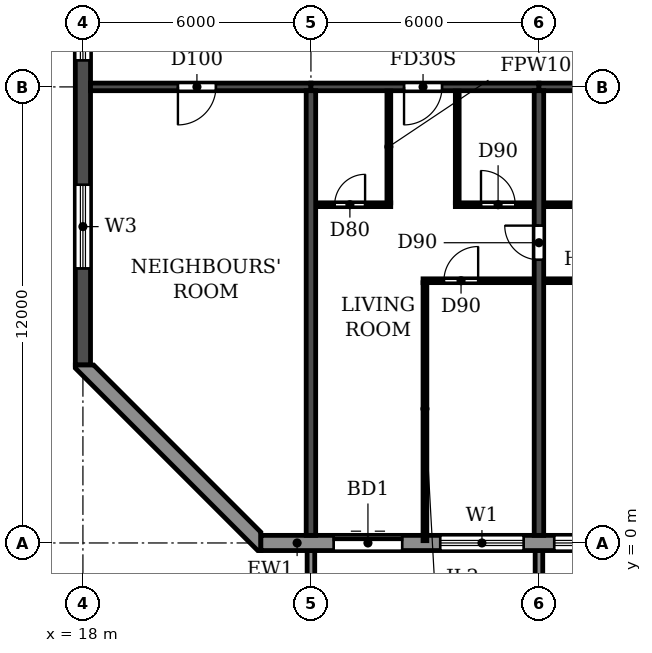
"""IFC4 building model, lengths in metres.
Left out: names, types, materials, properties, quantities, classifications, styles, units other than length and angle.
Written with IfcOpenShell. Run it as: python <this file> out.ifc"""

import sys

from ifc_helpers import new_model, si_unit, direction, frame, frame_2d, origin, place, context, subcontext, project, spatial, polyline, rectangle, outline, extrude, source, transform, mapped, element, fill, save


model = new_model("IFC4")
c1 = context("Model", 3, precision=1e-05, world=origin(), true_north=direction((0.0, 1.0)))
c2 = subcontext(c1, "Body", "Model", "MODEL_VIEW")
j1 = project(units=[si_unit("LENGTHUNIT", "METRE"), si_unit("PLANEANGLEUNIT", "RADIAN")], contexts=[c1])
p1 = place(None, origin())
s1 = spatial("IfcSite", under=j1, at=p1, CompositionType="ELEMENT")
p2 = place(p1, origin())
s2 = spatial("IfcBuilding", under=s1, at=p2, CompositionType="ELEMENT")
p3 = place(p2, frame((0.0, 0.0, 201.6)))
s3 = spatial("IfcBuildingStorey", under=s2, at=p3, CompositionType="ELEMENT", Elevation=201.6)
p4 = place(p3, frame((24.0, 0.2, 0.0), z_axis=(0.0, 0.0, 1.0), x_axis=(0.0, 1.0, 0.0)))
e1 = element("IfcWall", 1, at=p4, inside=s3, PredefinedType="SHEAR", context=c2, shape_type="SweptSolid", body=[
    extrude(rectangle(XDim=11.7, YDim=0.25, at=frame_2d((5.85, 0.0))), origin(), (0.0, 0.0, 1.0), 3.08),
])
p5 = place(p3, frame((30.0, 0.2, 0.0), z_axis=(0.0, 0.0, 1.0), x_axis=(0.0, 1.0, 0.0)))
e2 = element("IfcWall", 2, at=p5, inside=s3, PredefinedType="SHEAR", context=c2, shape_type="SweptSolid", body=[
    extrude(rectangle(XDim=11.7, YDim=0.25, at=frame_2d((5.85, 0.0))), origin(), (0.0, 0.0, 1.0), 3.08),
])
p6 = place(p5, frame((7.25, 0.0, 0.0)))
e3 = element("IfcOpeningElement", 3, at=p6, cuts=e2, PredefinedType="OPENING", context=c2, shape_type="SweptSolid", body=[
    extrude(rectangle(XDim=0.9, YDim=2.1, at=frame_2d((0.45, 1.05))), frame((0.0, 0.135, 0.0), z_axis=(0.0, -1.0, 0.0), x_axis=(1.0, 0.0, 0.0)), (0.0, 0.0, 1.0), 0.27),
])
p7 = place(p3, frame((18.0, 4.683, 0.0), z_axis=(0.0, 0.0, 1.0), x_axis=(0.0, 1.0, 0.0)))
e4 = element("IfcWall", 4, at=p7, inside=s3, PredefinedType="SHEAR", context=c2, shape_type="SweptSolid", body=[
    extrude(rectangle(XDim=31.834, YDim=0.4, at=frame_2d((15.917, 0.0))), origin(), (0.0, 0.0, 1.0), 3.08),
])
p8 = place(p7, frame((23.817, 0.0, 0.9)))
e5 = element("IfcOpeningElement", 5, at=p8, cuts=e4, PredefinedType="OPENING", context=c2, shape_type="SweptSolid", body=[
    extrude(rectangle(XDim=1.2, YDim=1.5, at=frame_2d((0.6, 0.75))), frame((0.0, 0.21, 0.0), z_axis=(0.0, -1.0, 0.0), x_axis=(1.0, 0.0, 0.0)), (0.0, 0.0, 1.0), 0.42),
])
p9 = place(p7, frame((8.017, 0.0, 0.9)))
e6 = element("IfcOpeningElement", 6, at=p9, cuts=e4, PredefinedType="OPENING", context=c2, shape_type="SweptSolid", body=[
    extrude(rectangle(XDim=1.2, YDim=1.5, at=frame_2d((0.6, 0.75))), frame((0.0, 0.21, 0.0), z_axis=(0.0, -1.0, 0.0), x_axis=(1.0, 0.0, 0.0)), (0.0, 0.0, 1.0), 0.42),
])
p10 = place(p7, frame((27.694, 0.0, 0.6)))
e7 = element("IfcOpeningElement", 7, at=p10, cuts=e4, PredefinedType="OPENING", context=c2, shape_type="SweptSolid", body=[
    extrude(rectangle(XDim=2.2, YDim=1.8, at=frame_2d((1.1, 0.9))), frame((0.0, 0.21, 0.0), z_axis=(0.0, -1.0, 0.0), x_axis=(1.0, 0.0, 0.0)), (0.0, 0.0, 1.0), 0.42),
])
p11 = place(p7, frame((2.541, 0.0, 0.6)))
e8 = element("IfcOpeningElement", 8, at=p11, cuts=e4, PredefinedType="OPENING", context=c2, shape_type="SweptSolid", body=[
    extrude(rectangle(XDim=2.2, YDim=1.8, at=frame_2d((1.1, 0.9))), frame((0.0, 0.21, 0.0), z_axis=(0.0, -1.0, 0.0), x_axis=(1.0, 0.0, 0.0)), (0.0, 0.0, 1.0), 0.42),
])
p12 = place(p7, frame((15.917, 0.0, 0.9)))
e9 = element("IfcOpeningElement", 9, at=p12, cuts=e4, PredefinedType="OPENING", context=c2, shape_type="SweptSolid", body=[
    extrude(rectangle(XDim=1.2, YDim=1.5, at=frame_2d((0.6, 0.75))), frame((0.0, 0.21, 0.0), z_axis=(0.0, -1.0, 0.0), x_axis=(1.0, 0.0, 0.0)), (0.0, 0.0, 1.0), 0.42),
])
p13 = place(p3, frame((18.2, 12.0, 0.0), z_axis=(0.0, 0.0, 1.0), x_axis=(1.0, 0.0, 0.0)))
e10 = element("IfcWall", 10, at=p13, inside=s3, PredefinedType="SHEAR", context=c2, shape_type="SweptSolid", body=[
    extrude(rectangle(XDim=5.8, YDim=0.2, at=frame_2d((2.9, 0.0))), origin(), (0.0, 0.0, 1.0), 2.48),
])
p14 = place(p13, frame((2.3, 0.0, 0.0)))
e11 = element("IfcOpeningElement", 11, at=p14, cuts=e10, PredefinedType="OPENING", context=c2, shape_type="SweptSolid", body=[
    extrude(rectangle(XDim=1.0, YDim=2.1, at=frame_2d((0.5, 1.05))), frame((0.0, 0.11, 0.0), z_axis=(0.0, -1.0, 0.0), x_axis=(1.0, 0.0, 0.0)), (0.0, 0.0, 1.0), 0.22),
])
p15 = place(p3, frame((24.0, 12.0, 0.0), z_axis=(0.0, 0.0, 1.0), x_axis=(1.0, 0.0, 0.0)))
e12 = element("IfcWall", 12, at=p15, inside=s3, PredefinedType="SHEAR", context=c2, shape_type="SweptSolid", body=[
    extrude(rectangle(XDim=6.0, YDim=0.2, at=frame_2d((3.0, 0.0))), origin(), (0.0, 0.0, 1.0), 2.48),
])
p16 = place(p15, frame((2.45, 0.0, 0.0)))
e13 = element("IfcOpeningElement", 13, at=p16, cuts=e12, PredefinedType="OPENING", context=c2, shape_type="SweptSolid", body=[
    extrude(rectangle(XDim=1.0, YDim=2.1, at=frame_2d((0.5, 1.05))), frame((0.0, 0.11, 0.0), z_axis=(0.0, -1.0, 0.0), x_axis=(1.0, 0.0, 0.0)), (0.0, 0.0, 1.0), 0.22),
])
p17 = place(p3, frame((30.0, 12.0, 0.0), z_axis=(0.0, 0.0, 1.0), x_axis=(1.0, 0.0, 0.0)))
e14 = element("IfcWall", 14, at=p17, inside=s3, PredefinedType="SHEAR", context=c2, shape_type="SweptSolid", body=[
    extrude(rectangle(XDim=6.0, YDim=0.2, at=frame_2d((3.0, 0.0))), origin(), (0.0, 0.0, 1.0), 2.48),
])
p18 = place(p3, frame((22.683, 0.0, 0.0), z_axis=(0.0, 0.0, 1.0), x_axis=(1.0, 0.0, 0.0)))
e15 = element("IfcWall", 15, at=p18, inside=s3, PredefinedType="STANDARD", context=c2, shape_type="SweptSolid", body=[
    extrude(rectangle(XDim=56.634, YDim=0.4, at=frame_2d((28.317, 0.0))), origin(), (0.0, 0.0, 1.0), 3.08),
])
p19 = place(p18, frame((1.917, 0.0, 0.0)))
e16 = element("IfcOpeningElement", 16, at=p19, cuts=e15, PredefinedType="OPENING", context=c2, shape_type="SweptSolid", body=[
    extrude(rectangle(XDim=1.8, YDim=2.4, at=frame_2d((0.9, 1.2))), frame((0.0, 0.21, 0.0), z_axis=(0.0, -1.0, 0.0), x_axis=(1.0, 0.0, 0.0)), (0.0, 0.0, 1.0), 0.42),
])
p20 = place(p18, frame((4.717, 0.0, 0.9)))
e17 = element("IfcOpeningElement", 17, at=p20, cuts=e15, PredefinedType="OPENING", context=c2, shape_type="SweptSolid", body=[
    extrude(rectangle(XDim=2.2, YDim=1.5, at=frame_2d((1.1, 0.75))), frame((0.0, 0.21, 0.0), z_axis=(0.0, -1.0, 0.0), x_axis=(1.0, 0.0, 0.0)), (0.0, 0.0, 1.0), 0.42),
])
p21 = place(p18, frame((7.717, 0.0, 0.9)))
e18 = element("IfcOpeningElement", 18, at=p21, cuts=e15, PredefinedType="OPENING", context=c2, shape_type="SweptSolid", body=[
    extrude(rectangle(XDim=2.2, YDim=1.5, at=frame_2d((1.1, 0.75))), frame((0.0, 0.21, 0.0), z_axis=(0.0, -1.0, 0.0), x_axis=(1.0, 0.0, 0.0)), (0.0, 0.0, 1.0), 0.42),
])
p22 = place(p18, frame((10.717, 0.0, 0.9)))
e19 = element("IfcOpeningElement", 19, at=p22, cuts=e15, PredefinedType="OPENING", context=c2, shape_type="SweptSolid", body=[
    extrude(rectangle(XDim=2.2, YDim=1.5, at=frame_2d((1.1, 0.75))), frame((0.0, 0.21, 0.0), z_axis=(0.0, -1.0, 0.0), x_axis=(1.0, 0.0, 0.0)), (0.0, 0.0, 1.0), 0.42),
])
p23 = place(p18, frame((13.917, 0.0, 0.0)))
e20 = element("IfcOpeningElement", 20, at=p23, cuts=e15, PredefinedType="OPENING", context=c2, shape_type="SweptSolid", body=[
    extrude(rectangle(XDim=1.8, YDim=2.4, at=frame_2d((0.9, 1.2))), frame((0.0, 0.21, 0.0), z_axis=(0.0, -1.0, 0.0), x_axis=(1.0, 0.0, 0.0)), (0.0, 0.0, 1.0), 0.42),
])
p24 = place(p18, frame((16.717, 0.0, 0.9)))
e21 = element("IfcOpeningElement", 21, at=p24, cuts=e15, PredefinedType="OPENING", context=c2, shape_type="SweptSolid", body=[
    extrude(rectangle(XDim=2.2, YDim=1.5, at=frame_2d((1.1, 0.75))), frame((0.0, 0.21, 0.0), z_axis=(0.0, -1.0, 0.0), x_axis=(1.0, 0.0, 0.0)), (0.0, 0.0, 1.0), 0.42),
])
p25 = place(p18, frame((19.717, 0.0, 0.9)))
e22 = element("IfcOpeningElement", 22, at=p25, cuts=e15, PredefinedType="OPENING", context=c2, shape_type="SweptSolid", body=[
    extrude(rectangle(XDim=2.2, YDim=1.5, at=frame_2d((1.1, 0.75))), frame((0.0, 0.21, 0.0), z_axis=(0.0, -1.0, 0.0), x_axis=(1.0, 0.0, 0.0)), (0.0, 0.0, 1.0), 0.42),
])
p26 = place(p18, frame((22.717, 0.0, 0.9)))
e23 = element("IfcOpeningElement", 23, at=p26, cuts=e15, PredefinedType="OPENING", context=c2, shape_type="SweptSolid", body=[
    extrude(rectangle(XDim=2.2, YDim=1.5, at=frame_2d((1.1, 0.75))), frame((0.0, 0.21, 0.0), z_axis=(0.0, -1.0, 0.0), x_axis=(1.0, 0.0, 0.0)), (0.0, 0.0, 1.0), 0.42),
])
p27 = place(p18, frame((25.917, 0.0, 0.0)))
e24 = element("IfcOpeningElement", 24, at=p27, cuts=e15, PredefinedType="OPENING", context=c2, shape_type="SweptSolid", body=[
    extrude(rectangle(XDim=1.8, YDim=2.4, at=frame_2d((0.9, 1.2))), frame((0.0, 0.21, 0.0), z_axis=(0.0, -1.0, 0.0), x_axis=(1.0, 0.0, 0.0)), (0.0, 0.0, 1.0), 0.42),
])
p28 = place(p18, frame((28.717, 0.0, 0.9)))
e25 = element("IfcOpeningElement", 25, at=p28, cuts=e15, PredefinedType="OPENING", context=c2, shape_type="SweptSolid", body=[
    extrude(rectangle(XDim=2.2, YDim=1.5, at=frame_2d((1.1, 0.75))), frame((0.0, 0.21, 0.0), z_axis=(0.0, -1.0, 0.0), x_axis=(1.0, 0.0, 0.0)), (0.0, 0.0, 1.0), 0.42),
])
p29 = place(p18, frame((31.717, 0.0, 0.9)))
e26 = element("IfcOpeningElement", 26, at=p29, cuts=e15, PredefinedType="OPENING", context=c2, shape_type="SweptSolid", body=[
    extrude(rectangle(XDim=2.2, YDim=1.5, at=frame_2d((1.1, 0.75))), frame((0.0, 0.21, 0.0), z_axis=(0.0, -1.0, 0.0), x_axis=(1.0, 0.0, 0.0)), (0.0, 0.0, 1.0), 0.42),
])
p30 = place(p18, frame((34.717, 0.0, 0.9)))
e27 = element("IfcOpeningElement", 27, at=p30, cuts=e15, PredefinedType="OPENING", context=c2, shape_type="SweptSolid", body=[
    extrude(rectangle(XDim=2.2, YDim=1.5, at=frame_2d((1.1, 0.75))), frame((0.0, 0.21, 0.0), z_axis=(0.0, -1.0, 0.0), x_axis=(1.0, 0.0, 0.0)), (0.0, 0.0, 1.0), 0.42),
])
p31 = place(p18, frame((37.717, 0.0, 0.9)))
e28 = element("IfcOpeningElement", 28, at=p31, cuts=e15, PredefinedType="OPENING", context=c2, shape_type="SweptSolid", body=[
    extrude(rectangle(XDim=2.2, YDim=1.5, at=frame_2d((1.1, 0.75))), frame((0.0, 0.21, 0.0), z_axis=(0.0, -1.0, 0.0), x_axis=(1.0, 0.0, 0.0)), (0.0, 0.0, 1.0), 0.42),
])
p32 = place(p18, frame((40.717, 0.0, 0.9)))
e29 = element("IfcOpeningElement", 29, at=p32, cuts=e15, PredefinedType="OPENING", context=c2, shape_type="SweptSolid", body=[
    extrude(rectangle(XDim=2.2, YDim=1.5, at=frame_2d((1.1, 0.75))), frame((0.0, 0.21, 0.0), z_axis=(0.0, -1.0, 0.0), x_axis=(1.0, 0.0, 0.0)), (0.0, 0.0, 1.0), 0.42),
])
p33 = place(p18, frame((43.717, 0.0, 0.9)))
e30 = element("IfcOpeningElement", 30, at=p33, cuts=e15, PredefinedType="OPENING", context=c2, shape_type="SweptSolid", body=[
    extrude(rectangle(XDim=2.2, YDim=1.5, at=frame_2d((1.1, 0.75))), frame((0.0, 0.21, 0.0), z_axis=(0.0, -1.0, 0.0), x_axis=(1.0, 0.0, 0.0)), (0.0, 0.0, 1.0), 0.42),
])
p34 = place(p18, frame((46.717, 0.0, 0.9)))
e31 = element("IfcOpeningElement", 31, at=p34, cuts=e15, PredefinedType="OPENING", context=c2, shape_type="SweptSolid", body=[
    extrude(rectangle(XDim=2.2, YDim=1.5, at=frame_2d((1.1, 0.75))), frame((0.0, 0.21, 0.0), z_axis=(0.0, -1.0, 0.0), x_axis=(1.0, 0.0, 0.0)), (0.0, 0.0, 1.0), 0.42),
])
p35 = place(p18, frame((49.717, 0.0, 0.9)))
e32 = element("IfcOpeningElement", 32, at=p35, cuts=e15, PredefinedType="OPENING", context=c2, shape_type="SweptSolid", body=[
    extrude(rectangle(XDim=2.2, YDim=1.5, at=frame_2d((1.1, 0.75))), frame((0.0, 0.21, 0.0), z_axis=(0.0, -1.0, 0.0), x_axis=(1.0, 0.0, 0.0)), (0.0, 0.0, 1.0), 0.42),
])
p36 = place(p18, frame((52.917, 0.0, 0.0)))
e33 = element("IfcOpeningElement", 33, at=p36, cuts=e15, PredefinedType="OPENING", context=c2, shape_type="SweptSolid", body=[
    extrude(rectangle(XDim=1.8, YDim=2.4, at=frame_2d((0.9, 1.2))), frame((0.0, 0.21, 0.0), z_axis=(0.0, -1.0, 0.0), x_axis=(1.0, 0.0, 0.0)), (0.0, 0.0, 1.0), 0.42),
])
p37 = place(p3, origin())
e34 = element("IfcWall", 34, at=p37, inside=s3, PredefinedType="STANDARD", context=c2, shape_type="SweptSolid", body=[
    extrude(outline(polyline([(17.8, 4.683), (17.8, 4.6), (22.6, -0.2), (22.683, -0.2), (22.683, 0.283), (18.283, 4.683), (17.8, 4.683)])), origin(), (0.0, 0.0, 1.0), 3.08),
])
m1 = source(origin(), c2, "Body", "SweptSolid", [
    extrude(outline(polyline([(0.0, 0.0), (0.2, 0.0), (0.2, 1.65), (0.0, 1.65), (0.0, 0.0)])), origin(), (0.0, 0.0, 1.0), 3.1),
])
for number, where in (
    (35, (23.9, -1.85, 0.0)),
    (36, (29.9, -1.85, 0.0)),
):
    element("IfcWall", number, at=place(p3, frame(where)), inside=s3, PredefinedType="STANDARD", context=c2, shape_type="MappedRepresentation", body=[
        mapped(m1, transform((0.0, 0.0, 0.0))),
    ])
p38 = place(p3, frame((26.95, 6.9, 0.0), z_axis=(0.0, 0.0, 1.0), x_axis=(1.0, 0.0, 0.0)))
e37 = element("IfcWall", 37, at=p38, inside=s3, PredefinedType="PARTITIONING", context=c2, shape_type="SweptSolid", body=[
    extrude(rectangle(XDim=2.915, YDim=0.1, at=frame_2d((1.458, 0.0))), origin(), (0.0, 0.0, 1.0), 3.08),
])
p39 = place(p38, frame((0.55, 0.0, 0.0)))
e38 = element("IfcOpeningElement", 38, at=p39, cuts=e37, PredefinedType="OPENING", context=c2, shape_type="SweptSolid", body=[
    extrude(rectangle(XDim=0.9, YDim=2.1, at=frame_2d((0.45, 1.05))), frame((0.0, 0.06, 0.0), z_axis=(0.0, -1.0, 0.0), x_axis=(1.0, 0.0, 0.0)), (0.0, 0.0, 1.0), 0.12),
])
p40 = place(p3, frame((30.135, 6.9, 0.0), z_axis=(0.0, 0.0, 1.0), x_axis=(1.0, 0.0, 0.0)))
e39 = element("IfcWall", 39, at=p40, inside=s3, PredefinedType="PARTITIONING", context=c2, shape_type="SweptSolid", body=[
    extrude(rectangle(XDim=2.765, YDim=0.1, at=frame_2d((1.382, 0.0))), origin(), (0.0, 0.0, 1.0), 3.08),
])
p41 = place(p40, frame((1.465, 0.0, 0.0)))
e40 = element("IfcOpeningElement", 40, at=p41, cuts=e39, PredefinedType="OPENING", context=c2, shape_type="SweptSolid", body=[
    extrude(rectangle(XDim=0.9, YDim=2.1, at=frame_2d((0.45, 1.05))), frame((0.0, 0.06, 0.0), z_axis=(0.0, -1.0, 0.0), x_axis=(1.0, 0.0, 0.0)), (0.0, 0.0, 1.0), 0.12),
])
p42 = place(p3, frame((24.135, 8.9, 0.0), z_axis=(0.0, 0.0, 1.0), x_axis=(1.0, 0.0, 0.0)))
e41 = element("IfcWall", 41, at=p42, inside=s3, PredefinedType="PARTITIONING", context=c2, shape_type="SweptSolid", body=[
    extrude(rectangle(XDim=1.965, YDim=0.1, at=frame_2d((0.982, 0.0))), origin(), (0.0, 0.0, 1.0), 3.08),
])
p43 = place(p42, frame((0.49, 0.0, 0.0)))
e42 = element("IfcOpeningElement", 42, at=p43, cuts=e41, PredefinedType="OPENING", context=c2, shape_type="SweptSolid", body=[
    extrude(rectangle(XDim=0.8, YDim=2.1, at=frame_2d((0.4, 1.05))), frame((0.0, 0.06, 0.0), z_axis=(0.0, -1.0, 0.0), x_axis=(1.0, 0.0, 0.0)), (0.0, 0.0, 1.0), 0.12),
])
p44 = place(p3, frame((27.8, 8.9, 0.0), z_axis=(0.0, 0.0, 1.0), x_axis=(1.0, 0.0, 0.0)))
e43 = element("IfcWall", 43, at=p44, inside=s3, PredefinedType="PARTITIONING", context=c2, shape_type="SweptSolid", body=[
    extrude(rectangle(XDim=2.065, YDim=0.1, at=frame_2d((1.032, 0.0))), origin(), (0.0, 0.0, 1.0), 3.08),
])
p45 = place(p44, frame((0.675, 0.0, 0.0)))
e44 = element("IfcOpeningElement", 44, at=p45, cuts=e43, PredefinedType="OPENING", context=c2, shape_type="SweptSolid", body=[
    extrude(rectangle(XDim=0.9, YDim=2.1, at=frame_2d((0.45, 1.05))), frame((0.0, 0.06, 0.0), z_axis=(0.0, -1.0, 0.0), x_axis=(1.0, 0.0, 0.0)), (0.0, 0.0, 1.0), 0.12),
])
p46 = place(p3, frame((30.135, 8.9, 0.0), z_axis=(0.0, 0.0, 1.0), x_axis=(1.0, 0.0, 0.0)))
e45 = element("IfcWall", 45, at=p46, inside=s3, PredefinedType="PARTITIONING", context=c2, shape_type="SweptSolid", body=[
    extrude(rectangle(XDim=2.765, YDim=0.1, at=frame_2d((1.382, 0.0))), origin(), (0.0, 0.0, 1.0), 3.08),
])
p47 = place(p46, frame((0.965, 0.0, 0.0)))
e46 = element("IfcOpeningElement", 46, at=p47, cuts=e45, PredefinedType="OPENING", context=c2, shape_type="SweptSolid", body=[
    extrude(rectangle(XDim=0.8, YDim=2.1, at=frame_2d((0.4, 1.05))), frame((0.0, 0.06, 0.0), z_axis=(0.0, -1.0, 0.0), x_axis=(1.0, 0.0, 0.0)), (0.0, 0.0, 1.0), 0.12),
])
p48 = place(p3, frame((26.05, 8.95, 0.0), z_axis=(0.0, 0.0, 1.0), x_axis=(0.0, 1.0, 0.0)))
e47 = element("IfcWall", 47, at=p48, inside=s3, PredefinedType="PARTITIONING", context=c2, shape_type="SweptSolid", body=[
    extrude(rectangle(XDim=2.94, YDim=0.1, at=frame_2d((1.47, 0.0))), origin(), (0.0, 0.0, 1.0), 3.08),
])
p49 = place(p3, frame((27.0, 0.06, 0.0), z_axis=(0.0, 0.0, 1.0), x_axis=(0.0, 1.0, 0.0)))
e48 = element("IfcWall", 48, at=p49, inside=s3, PredefinedType="PARTITIONING", context=c2, shape_type="SweptSolid", body=[
    extrude(rectangle(XDim=6.79, YDim=0.1, at=frame_2d((3.395, 0.0))), origin(), (0.0, 0.0, 1.0), 3.08),
])
p50 = place(p3, frame((27.85, 8.95, 0.0), z_axis=(0.0, 0.0, 1.0), x_axis=(0.0, 1.0, 0.0)))
e49 = element("IfcWall", 49, at=p50, inside=s3, PredefinedType="PARTITIONING", context=c2, shape_type="SweptSolid", body=[
    extrude(rectangle(XDim=2.94, YDim=0.1, at=frame_2d((1.47, 0.0))), origin(), (0.0, 0.0, 1.0), 3.08),
])
p51 = place(p19, origin())
e50 = element("IfcDoor", 50, at=p51, inside=s3, OperationType="DOUBLE_DOOR_SLIDING", PredefinedType="DOOR", context=c2, shape_type="SweptSolid", body=[
    extrude(rectangle(XDim=1.8, YDim=2.4, at=frame_2d((0.9, 1.2))), frame((0.0, 0.025, 0.0), z_axis=(0.0, -1.0, 0.0), x_axis=(1.0, 0.0, 0.0)), (0.0, 0.0, 1.0), 0.05),
])
fill(e16, e50)
p52 = place(p20, origin())
e51 = element("IfcWindow", 51, at=p52, inside=s3, PartitioningType="DOUBLE_PANEL_HORIZONTAL", PredefinedType="WINDOW", context=c2, shape_type="SweptSolid", body=[
    extrude(rectangle(XDim=2.2, YDim=1.5, at=frame_2d((1.1, 0.75))), frame((0.0, 0.03, 0.0), z_axis=(0.0, -1.0, 0.0), x_axis=(1.0, 0.0, 0.0)), (0.0, 0.0, 1.0), 0.06),
])
fill(e17, e51)
p53 = place(p21, origin())
e52 = element("IfcWindow", 52, at=p53, inside=s3, PartitioningType="DOUBLE_PANEL_HORIZONTAL", PredefinedType="WINDOW", context=c2, shape_type="SweptSolid", body=[
    extrude(rectangle(XDim=2.2, YDim=1.5, at=frame_2d((1.1, 0.75))), frame((0.0, 0.03, 0.0), z_axis=(0.0, -1.0, 0.0), x_axis=(1.0, 0.0, 0.0)), (0.0, 0.0, 1.0), 0.06),
])
fill(e18, e52)
p54 = place(p9, origin())
e53 = element("IfcWindow", 53, at=p54, inside=s3, PartitioningType="SINGLE_PANEL", PredefinedType="WINDOW", context=c2, shape_type="SweptSolid", body=[
    extrude(rectangle(XDim=1.2, YDim=1.5, at=frame_2d((0.6, 0.75))), frame((0.0, 0.03, 0.0), z_axis=(0.0, -1.0, 0.0), x_axis=(1.0, 0.0, 0.0)), (0.0, 0.0, 1.0), 0.06),
])
fill(e6, e53)
p55 = place(p11, origin())
e54 = element("IfcWindow", 54, at=p55, inside=s3, PartitioningType="DOUBLE_PANEL_HORIZONTAL", PredefinedType="WINDOW", context=c2, shape_type="SweptSolid", body=[
    extrude(rectangle(XDim=2.2, YDim=1.8, at=frame_2d((1.1, 0.9))), frame((0.0, 0.03, 0.0), z_axis=(0.0, -1.0, 0.0), x_axis=(1.0, 0.0, 0.0)), (0.0, 0.0, 1.0), 0.06),
])
fill(e8, e54)
p56 = place(p14, frame((1.0, 0.0, 0.0), z_axis=(0.0, 0.0, 1.0), x_axis=(-1.0, 0.0, 0.0)))
e55 = element("IfcDoor", 55, at=p56, inside=s3, OperationType="SINGLE_SWING_RIGHT", PredefinedType="DOOR", context=c2, shape_type="SweptSolid", body=[
    extrude(rectangle(XDim=1.0, YDim=2.1, at=frame_2d((0.5, 1.05))), frame((0.0, 0.025, 0.0), z_axis=(0.0, -1.0, 0.0), x_axis=(1.0, 0.0, 0.0)), (0.0, 0.0, 1.0), 0.05),
])
fill(e11, e55)
p57 = place(p43, origin())
e56 = element("IfcDoor", 56, at=p57, inside=s3, OperationType="SINGLE_SWING_RIGHT", PredefinedType="DOOR", context=c2, shape_type="SweptSolid", body=[
    extrude(rectangle(XDim=0.8, YDim=2.1, at=frame_2d((0.4, 1.05))), frame((0.0, 0.025, 0.0), z_axis=(0.0, -1.0, 0.0), x_axis=(1.0, 0.0, 0.0)), (0.0, 0.0, 1.0), 0.05),
])
fill(e42, e56)
p58 = place(p16, frame((1.0, 0.0, 0.0), z_axis=(0.0, 0.0, 1.0), x_axis=(-1.0, 0.0, 0.0)))
e57 = element("IfcDoor", 57, at=p58, inside=s3, OperationType="SINGLE_SWING_RIGHT", PredefinedType="DOOR", context=c2, shape_type="SweptSolid", body=[
    extrude(rectangle(XDim=1.0, YDim=2.1, at=frame_2d((0.5, 1.05))), frame((0.0, 0.025, 0.0), z_axis=(0.0, -1.0, 0.0), x_axis=(1.0, 0.0, 0.0)), (0.0, 0.0, 1.0), 0.05),
])
fill(e13, e57)
p59 = place(p39, origin())
e58 = element("IfcDoor", 58, at=p59, inside=s3, OperationType="SINGLE_SWING_RIGHT", PredefinedType="DOOR", context=c2, shape_type="SweptSolid", body=[
    extrude(rectangle(XDim=0.9, YDim=2.1, at=frame_2d((0.45, 1.05))), frame((0.0, 0.025, 0.0), z_axis=(0.0, -1.0, 0.0), x_axis=(1.0, 0.0, 0.0)), (0.0, 0.0, 1.0), 0.05),
])
fill(e38, e58)
p60 = place(p45, origin())
e59 = element("IfcDoor", 59, at=p60, inside=s3, OperationType="SINGLE_SWING_LEFT", PredefinedType="DOOR", context=c2, shape_type="SweptSolid", body=[
    extrude(rectangle(XDim=0.9, YDim=2.1, at=frame_2d((0.45, 1.05))), frame((0.0, 0.025, 0.0), z_axis=(0.0, -1.0, 0.0), x_axis=(1.0, 0.0, 0.0)), (0.0, 0.0, 1.0), 0.05),
])
fill(e44, e59)
p61 = place(p6, origin())
e60 = element("IfcDoor", 60, at=p61, inside=s3, OperationType="SINGLE_SWING_RIGHT", PredefinedType="DOOR", context=c2, shape_type="SweptSolid", body=[
    extrude(rectangle(XDim=0.9, YDim=2.1, at=frame_2d((0.45, 1.05))), frame((0.0, 0.025, 0.0), z_axis=(0.0, -1.0, 0.0), x_axis=(1.0, 0.0, 0.0)), (0.0, 0.0, 1.0), 0.05),
])
fill(e3, e60)
save(model, sys.argv[1])
